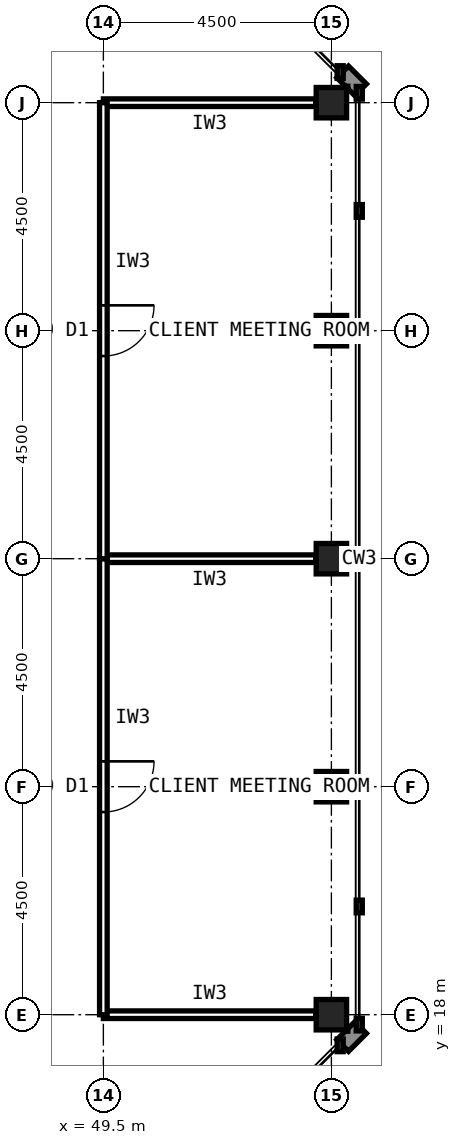
"""IFC4 building model, lengths in metres.
Left out: names, types, materials, properties, quantities, classifications, styles, units other than length and angle.
Written with IfcOpenShell. Run it as: python <this file> out.ifc"""

import sys

from ifc_helpers import new_model, si_unit, direction, frame, frame_2d, origin, origin_2d, place, context, subcontext, project, spatial, rectangle, hollow_rectangle, extrude, element, fill, save


model = new_model("IFC4")
c1 = context("Model", 3, precision=1e-05, world=origin(), true_north=direction((0.0, 1.0)))
c2 = subcontext(c1, "Body", "Model", "MODEL_VIEW")
j1 = project(units=[si_unit("LENGTHUNIT", "METRE"), si_unit("PLANEANGLEUNIT", "RADIAN")], contexts=[c1])
p1 = place(None, origin())
s1 = spatial("IfcSite", under=j1, at=p1, CompositionType="ELEMENT")
p2 = place(p1, origin())
s2 = spatial("IfcBuilding", under=s1, at=p2, CompositionType="ELEMENT")
p3 = place(p2, frame((0.0, 0.0, 262.6)))
s3 = spatial("IfcBuildingStorey", under=s2, at=p3, CompositionType="ELEMENT", Elevation=262.6)
for number, where, z_axis, x_axis in (
    (1, (54.0, 18.0, 0.0), (0.0, 0.0, 1.0), (1.0, 0.0, 0.0)),
    (2, (54.0, 22.5, 0.0), (0.0, 0.0, 1.0), (1.0, 0.0, 0.0)),
    (3, (54.0, 27.0, 0.0), (0.0, 0.0, 1.0), (1.0, 0.0, 0.0)),
    (4, (54.0, 31.5, 0.0), (0.0, 0.0, 1.0), (1.0, 0.0, 0.0)),
    (5, (54.0, 36.0, 0.0), (0.0, 0.0, 1.0), (1.0, 0.0, 0.0)),
):
    element("IfcColumn", number, at=place(p3, frame(where, z_axis=z_axis, x_axis=x_axis)), inside=s3, PredefinedType="COLUMN", context=c2, shape_type="SweptSolid", body=[
        extrude(hollow_rectangle(XDim=0.6, YDim=0.6, WallThickness=0.028, at=origin_2d()), origin(), (0.0, 0.0, 1.0), 4.0),
    ])
for number, where, z_axis, x_axis in (
    (6, (49.5, 18.0, 0.0), (0.0, 0.0, 1.0), (1.0, 0.0, 0.0)),
    (7, (53.69, 27.0, 0.0), (0.0, 0.0, 1.0), (-1.0, 0.0, 0.0)),
):
    element("IfcWall", number, at=place(p3, frame(where, z_axis=z_axis, x_axis=x_axis)), inside=s3, PredefinedType="PARTITIONING", context=c2, shape_type="SweptSolid", body=[
        extrude(rectangle(XDim=4.19, YDim=0.15, at=frame_2d((2.095, 0.0))), origin(), (0.0, 0.0, 1.0), 2.989),
    ])
p4 = place(p3, frame((49.5, 27.0, 0.0), z_axis=(0.0, 0.0, 1.0), x_axis=(0.0, -1.0, 0.0)))
e8 = element("IfcWall", 8, at=p4, inside=s3, PredefinedType="PARTITIONING", context=c2, shape_type="SweptSolid", body=[
    extrude(rectangle(XDim=9.0, YDim=0.15, at=frame_2d((4.5, 0.0))), origin(), (0.0, 0.0, 1.0), 3.84),
])
p5 = place(p4, frame((4.0, 0.0, 0.0)))
e9 = element("IfcOpeningElement", 9, at=p5, cuts=e8, PredefinedType="OPENING", context=c2, shape_type="SweptSolid", body=[
    extrude(rectangle(XDim=1.0, YDim=2.1, at=frame_2d((0.5, 1.05))), frame((0.0, 0.085, 0.0), z_axis=(0.0, -1.0, 0.0), x_axis=(1.0, 0.0, 0.0)), (0.0, 0.0, 1.0), 0.17),
])
p6 = place(p3, frame((53.69, 36.0, 0.0), z_axis=(0.0, 0.0, 1.0), x_axis=(-1.0, 0.0, 0.0)))
e10 = element("IfcWall", 10, at=p6, inside=s3, PredefinedType="PARTITIONING", context=c2, shape_type="SweptSolid", body=[
    extrude(rectangle(XDim=4.19, YDim=0.15, at=frame_2d((2.095, 0.0))), origin(), (0.0, 0.0, 1.0), 2.989),
])
p7 = place(p3, frame((49.5, 36.0, 0.0), z_axis=(0.0, 0.0, 1.0), x_axis=(0.0, -1.0, 0.0)))
e11 = element("IfcWall", 11, at=p7, inside=s3, PredefinedType="PARTITIONING", context=c2, shape_type="SweptSolid", body=[
    extrude(rectangle(XDim=9.0, YDim=0.15, at=frame_2d((4.5, 0.0))), origin(), (0.0, 0.0, 1.0), 3.84),
])
p8 = place(p7, frame((4.0, 0.0, 0.0)))
e12 = element("IfcOpeningElement", 12, at=p8, cuts=e11, PredefinedType="OPENING", context=c2, shape_type="SweptSolid", body=[
    extrude(rectangle(XDim=1.0, YDim=2.1, at=frame_2d((0.5, 1.05))), frame((0.0, 0.085, 0.0), z_axis=(0.0, -1.0, 0.0), x_axis=(1.0, 0.0, 0.0)), (0.0, 0.0, 1.0), 0.17),
])
p9 = place(p5, origin())
e13 = element("IfcDoor", 13, at=p9, inside=s3, OperationType="SINGLE_SWING_LEFT", PredefinedType="DOOR", context=c2, shape_type="SweptSolid", body=[
    extrude(rectangle(XDim=1.0, YDim=2.1, at=frame_2d((0.5, 1.05))), frame((0.0, 0.025, 0.0), z_axis=(0.0, -1.0, 0.0), x_axis=(1.0, 0.0, 0.0)), (0.0, 0.0, 1.0), 0.05),
])
fill(e9, e13)
p10 = place(p8, origin())
e14 = element("IfcDoor", 14, at=p10, inside=s3, OperationType="SINGLE_SWING_LEFT", PredefinedType="DOOR", context=c2, shape_type="SweptSolid", body=[
    extrude(rectangle(XDim=1.0, YDim=2.1, at=frame_2d((0.5, 1.05))), frame((0.0, 0.025, 0.0), z_axis=(0.0, -1.0, 0.0), x_axis=(1.0, 0.0, 0.0)), (0.0, 0.0, 1.0), 0.05),
])
fill(e12, e14)
save(model, sys.argv[1])
